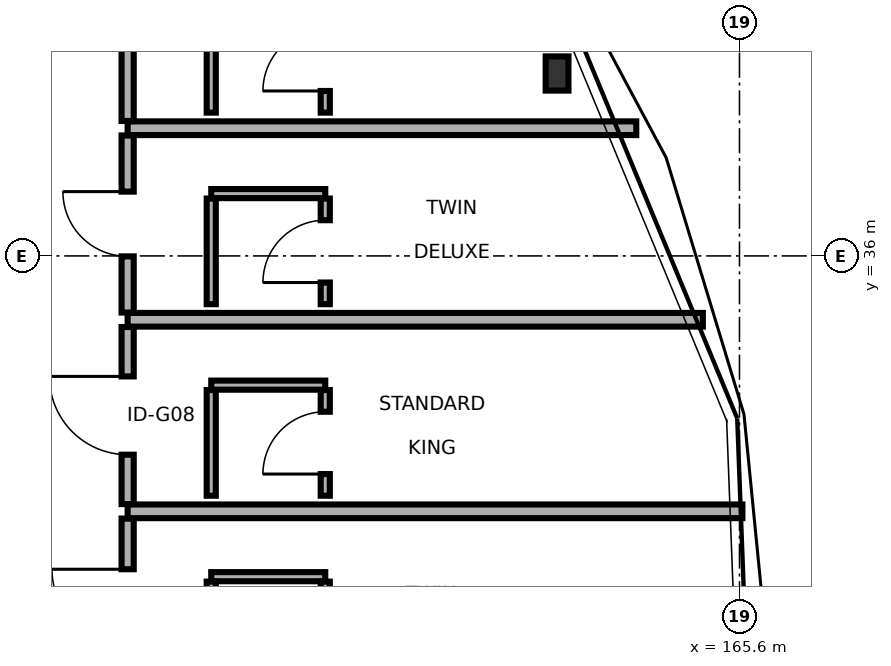
"""IFC4 building model, lengths in metres.
Left out: names, types, materials, properties, quantities, classifications, styles, units other than length and angle.
Written with IfcOpenShell. Run it as: python <this file> out.ifc"""

import sys

from ifc_helpers import new_model, si_unit, direction, frame, frame_2d, origin, origin_2d, place, context, subcontext, project, spatial, rectangle, i_section, extrude, element, fill, save


model = new_model("IFC4")
c1 = context("Model", 3, precision=1e-05, world=origin(), true_north=direction((0.0, 1.0)))
c2 = subcontext(c1, "Body", "Model", "MODEL_VIEW")
j1 = project(units=[si_unit("LENGTHUNIT", "METRE"), si_unit("PLANEANGLEUNIT", "RADIAN")], contexts=[c1])
p1 = place(None, origin())
s1 = spatial("IfcSite", under=j1, at=p1, CompositionType="ELEMENT")
p2 = place(p1, origin())
s2 = spatial("IfcBuilding", under=s1, at=p2, CompositionType="ELEMENT")
p3 = place(p2, frame((0.0, 0.0, 31.7)))
s3 = spatial("IfcBuildingStorey", under=s2, at=p3, CompositionType="ELEMENT", Elevation=31.7)
p4 = place(p3, frame((163.2, 38.4, 0.0), z_axis=(0.0, 0.0, 1.0), x_axis=(1.0, 0.0, 0.0)))
e1 = element("IfcColumn", 1, at=p4, inside=s3, PredefinedType="COLUMN", context=c2, shape_type="SweptSolid", body=[
    extrude(i_section(OverallWidth=0.3, OverallDepth=0.45, WebThickness=0.014, FlangeThickness=0.026, FilletRadius=0.027, at=origin_2d()), origin(), (0.0, 0.0, 1.0), 3.4),
])
p5 = place(p3, frame((157.55, 30.215, 0.0), z_axis=(0.0, 0.0, 1.0), x_axis=(0.0, 1.0, 0.0)))
e2 = element("IfcWall", 2, at=p5, inside=s3, PredefinedType="PARTITIONING", context=c2, shape_type="SweptSolid", body=[
    extrude(rectangle(XDim=2.33, YDim=0.16, at=frame_2d((1.165, 0.0))), origin(), (0.0, 0.0, 1.0), 2.755),
])
p6 = place(p5, frame((0.667, 0.0, 0.0)))
e3 = element("IfcOpeningElement", 3, at=p6, cuts=e2, PredefinedType="OPENING", context=c2, shape_type="SweptSolid", body=[
    extrude(rectangle(XDim=0.996, YDim=2.1, at=frame_2d((0.498, 1.05))), frame((0.0, 0.09, 0.0), z_axis=(0.0, -1.0, 0.0), x_axis=(1.0, 0.0, 0.0)), (0.0, 0.0, 1.0), 0.18),
])
p7 = place(p3, frame((158.65, 31.78, 0.0), z_axis=(0.0, 0.0, 1.0), x_axis=(1.0, 0.0, 0.0)))
e4 = element("IfcWall", 4, at=p7, inside=s3, PredefinedType="PARTITIONING", context=c2, shape_type="SweptSolid", body=[
    extrude(rectangle(XDim=1.5, YDim=0.12, at=frame_2d((0.75, 0.0))), origin(), (0.0, 0.0, 1.0), 3.17),
])
p8 = place(p3, frame((158.65, 30.325, 0.0), z_axis=(0.0, 0.0, 1.0), x_axis=(0.0, 1.0, 0.0)))
e5 = element("IfcWall", 5, at=p8, inside=s3, PredefinedType="PARTITIONING", context=c2, shape_type="SweptSolid", body=[
    extrude(rectangle(XDim=1.39, YDim=0.12, at=frame_2d((0.695, 0.0))), origin(), (0.0, 0.0, 1.0), 2.755),
])
p9 = place(p3, frame((160.15, 30.325, 0.0), z_axis=(0.0, 0.0, 1.0), x_axis=(0.0, 1.0, 0.0)))
e6 = element("IfcWall", 6, at=p9, inside=s3, PredefinedType="PARTITIONING", context=c2, shape_type="SweptSolid", body=[
    extrude(rectangle(XDim=1.39, YDim=0.12, at=frame_2d((0.695, 0.0))), origin(), (0.0, 0.0, 1.0), 2.755),
])
p10 = place(p9, frame((0.285, 0.0, 0.0)))
e7 = element("IfcOpeningElement", 7, at=p10, cuts=e6, PredefinedType="OPENING", context=c2, shape_type="SweptSolid", body=[
    extrude(rectangle(XDim=0.82, YDim=2.08, at=frame_2d((0.41, 1.04))), frame((0.0, 0.07, 0.0), z_axis=(0.0, -1.0, 0.0), x_axis=(1.0, 0.0, 0.0)), (0.0, 0.0, 1.0), 0.14),
])
p11 = place(p3, frame((157.55, 32.64, 0.0), z_axis=(0.0, 0.0, 1.0), x_axis=(1.0, 0.0, 0.0)))
e8 = element("IfcWall", 8, at=p11, inside=s3, PredefinedType="PARTITIONING", context=c2, shape_type="SweptSolid", body=[
    extrude(rectangle(XDim=8.088, YDim=0.18, at=frame_2d((4.044, 0.0))), origin(), (0.0, 0.0, 1.0), 2.655),
])
p12 = place(p3, frame((157.55, 32.735, 0.0), z_axis=(0.0, 0.0, 1.0), x_axis=(0.0, 1.0, 0.0)))
e9 = element("IfcWall", 9, at=p12, inside=s3, PredefinedType="PARTITIONING", context=c2, shape_type="SweptSolid", body=[
    extrude(rectangle(XDim=2.33, YDim=0.16, at=frame_2d((1.165, 0.0))), origin(), (0.0, 0.0, 1.0), 3.17),
])
p13 = place(p12, frame((0.65, 0.0, 0.0)))
e10 = element("IfcOpeningElement", 10, at=p13, cuts=e9, PredefinedType="OPENING", context=c2, shape_type="SweptSolid", body=[
    extrude(rectangle(XDim=1.03, YDim=2.05, at=frame_2d((0.515, 1.025))), frame((0.0, 0.09, 0.0), z_axis=(0.0, -1.0, 0.0), x_axis=(1.0, 0.0, 0.0)), (0.0, 0.0, 1.0), 0.18),
])
p14 = place(p3, frame((158.65, 34.3, 0.0), z_axis=(0.0, 0.0, 1.0), x_axis=(1.0, 0.0, 0.0)))
e11 = element("IfcWall", 11, at=p14, inside=s3, PredefinedType="PARTITIONING", context=c2, shape_type="SweptSolid", body=[
    extrude(rectangle(XDim=1.5, YDim=0.12, at=frame_2d((0.75, 0.0))), origin(), (0.0, 0.0, 1.0), 3.17),
])
p15 = place(p3, frame((158.65, 32.845, 0.0), z_axis=(0.0, 0.0, 1.0), x_axis=(0.0, 1.0, 0.0)))
e12 = element("IfcWall", 12, at=p15, inside=s3, PredefinedType="PARTITIONING", context=c2, shape_type="SweptSolid", body=[
    extrude(rectangle(XDim=1.39, YDim=0.12, at=frame_2d((0.695, 0.0))), origin(), (0.0, 0.0, 1.0), 3.17),
])
p16 = place(p3, frame((160.15, 32.845, 0.0), z_axis=(0.0, 0.0, 1.0), x_axis=(0.0, 1.0, 0.0)))
e13 = element("IfcWall", 13, at=p16, inside=s3, PredefinedType="PARTITIONING", context=c2, shape_type="SweptSolid", body=[
    extrude(rectangle(XDim=1.39, YDim=0.12, at=frame_2d((0.695, 0.0))), origin(), (0.0, 0.0, 1.0), 3.17),
])
p17 = place(p16, frame((0.285, 0.0, 0.0)))
e14 = element("IfcOpeningElement", 14, at=p17, cuts=e13, PredefinedType="OPENING", context=c2, shape_type="SweptSolid", body=[
    extrude(rectangle(XDim=0.82, YDim=2.08, at=frame_2d((0.41, 1.04))), frame((0.0, 0.07, 0.0), z_axis=(0.0, -1.0, 0.0), x_axis=(1.0, 0.0, 0.0)), (0.0, 0.0, 1.0), 0.14),
])
p18 = place(p3, frame((157.55, 35.16, 0.0), z_axis=(0.0, 0.0, 1.0), x_axis=(1.0, 0.0, 0.0)))
e15 = element("IfcWall", 15, at=p18, inside=s3, PredefinedType="PARTITIONING", context=c2, shape_type="SweptSolid", body=[
    extrude(rectangle(XDim=7.568, YDim=0.18, at=frame_2d((3.784, 0.0))), origin(), (0.0, 0.0, 1.0), 2.655),
])
p19 = place(p3, frame((157.55, 35.255, 0.0), z_axis=(0.0, 0.0, 1.0), x_axis=(0.0, 1.0, 0.0)))
e16 = element("IfcWall", 16, at=p19, inside=s3, PredefinedType="PARTITIONING", context=c2, shape_type="SweptSolid", body=[
    extrude(rectangle(XDim=2.33, YDim=0.16, at=frame_2d((1.165, 0.0))), origin(), (0.0, 0.0, 1.0), 3.17),
])
p20 = place(p19, frame((0.739, 0.0, 0.0)))
e17 = element("IfcOpeningElement", 17, at=p20, cuts=e16, PredefinedType="OPENING", context=c2, shape_type="SweptSolid", body=[
    extrude(rectangle(XDim=0.852, YDim=2.1, at=frame_2d((0.426, 1.05))), frame((0.0, 0.09, 0.0), z_axis=(0.0, -1.0, 0.0), x_axis=(1.0, 0.0, 0.0)), (0.0, 0.0, 1.0), 0.18),
])
p21 = place(p3, frame((158.65, 36.82, 0.0), z_axis=(0.0, 0.0, 1.0), x_axis=(1.0, 0.0, 0.0)))
e18 = element("IfcWall", 18, at=p21, inside=s3, PredefinedType="PARTITIONING", context=c2, shape_type="SweptSolid", body=[
    extrude(rectangle(XDim=1.5, YDim=0.12, at=frame_2d((0.75, 0.0))), origin(), (0.0, 0.0, 1.0), 3.17),
])
p22 = place(p3, frame((158.65, 35.365, 0.0), z_axis=(0.0, 0.0, 1.0), x_axis=(0.0, 1.0, 0.0)))
e19 = element("IfcWall", 19, at=p22, inside=s3, PredefinedType="PARTITIONING", context=c2, shape_type="SweptSolid", body=[
    extrude(rectangle(XDim=1.39, YDim=0.12, at=frame_2d((0.695, 0.0))), origin(), (0.0, 0.0, 1.0), 3.17),
])
p23 = place(p3, frame((160.15, 35.365, 0.0), z_axis=(0.0, 0.0, 1.0), x_axis=(0.0, 1.0, 0.0)))
e20 = element("IfcWall", 20, at=p23, inside=s3, PredefinedType="PARTITIONING", context=c2, shape_type="SweptSolid", body=[
    extrude(rectangle(XDim=1.39, YDim=0.12, at=frame_2d((0.695, 0.0))), origin(), (0.0, 0.0, 1.0), 3.17),
])
p24 = place(p23, frame((0.285, 0.0, 0.0)))
e21 = element("IfcOpeningElement", 21, at=p24, cuts=e20, PredefinedType="OPENING", context=c2, shape_type="SweptSolid", body=[
    extrude(rectangle(XDim=0.82, YDim=2.08, at=frame_2d((0.41, 1.04))), frame((0.0, 0.07, 0.0), z_axis=(0.0, -1.0, 0.0), x_axis=(1.0, 0.0, 0.0)), (0.0, 0.0, 1.0), 0.14),
])
p25 = place(p3, frame((157.55, 37.68, 0.0), z_axis=(0.0, 0.0, 1.0), x_axis=(1.0, 0.0, 0.0)))
e22 = element("IfcWall", 22, at=p25, inside=s3, PredefinedType="PARTITIONING", context=c2, shape_type="SweptSolid", body=[
    extrude(rectangle(XDim=6.692, YDim=0.18, at=frame_2d((3.346, 0.0))), origin(), (0.0, 0.0, 1.0), 2.655),
])
p26 = place(p3, frame((157.55, 37.775, 0.0), z_axis=(0.0, 0.0, 1.0), x_axis=(0.0, 1.0, 0.0)))
e23 = element("IfcWall", 23, at=p26, inside=s3, PredefinedType="PARTITIONING", context=c2, shape_type="SweptSolid", body=[
    extrude(rectangle(XDim=2.33, YDim=0.16, at=frame_2d((1.165, 0.0))), origin(), (0.0, 0.0, 1.0), 2.755),
])
p27 = place(p26, frame((1.34, 0.0, 0.0)))
e24 = element("IfcOpeningElement", 24, at=p27, cuts=e23, PredefinedType="OPENING", context=c2, shape_type="SweptSolid", body=[
    extrude(rectangle(XDim=0.83, YDim=2.11, at=frame_2d((0.415, 1.055))), frame((0.0, 0.09, 0.0), z_axis=(0.0, -1.0, 0.0), x_axis=(1.0, 0.0, 0.0)), (0.0, 0.0, 1.0), 0.18),
])
p28 = place(p3, frame((158.65, 37.885, 0.0), z_axis=(0.0, 0.0, 1.0), x_axis=(0.0, 1.0, 0.0)))
e25 = element("IfcWall", 25, at=p28, inside=s3, PredefinedType="PARTITIONING", context=c2, shape_type="SweptSolid", body=[
    extrude(rectangle(XDim=1.39, YDim=0.12, at=frame_2d((0.695, 0.0))), origin(), (0.0, 0.0, 1.0), 2.755),
])
p29 = place(p3, frame((160.15, 37.885, 0.0), z_axis=(0.0, 0.0, 1.0), x_axis=(0.0, 1.0, 0.0)))
e26 = element("IfcWall", 26, at=p29, inside=s3, PredefinedType="PARTITIONING", context=c2, shape_type="SweptSolid", body=[
    extrude(rectangle(XDim=1.39, YDim=0.12, at=frame_2d((0.695, 0.0))), origin(), (0.0, 0.0, 1.0), 2.755),
])
p30 = place(p29, frame((0.285, 0.0, 0.0)))
e27 = element("IfcOpeningElement", 27, at=p30, cuts=e26, PredefinedType="OPENING", context=c2, shape_type="SweptSolid", body=[
    extrude(rectangle(XDim=0.82, YDim=2.08, at=frame_2d((0.41, 1.04))), frame((0.0, 0.07, 0.0), z_axis=(0.0, -1.0, 0.0), x_axis=(1.0, 0.0, 0.0)), (0.0, 0.0, 1.0), 0.14),
])
p31 = place(p6, origin())
e28 = element("IfcDoor", 28, at=p31, inside=s3, OperationType="SINGLE_SWING_RIGHT", PredefinedType="DOOR", context=c2, shape_type="SweptSolid", body=[
    extrude(rectangle(XDim=0.996, YDim=2.1, at=frame_2d((0.498, 1.05))), frame((0.0, 0.025, 0.0), z_axis=(0.0, -1.0, 0.0), x_axis=(1.0, 0.0, 0.0)), (0.0, 0.0, 1.0), 0.05),
])
fill(e3, e28)
p32 = place(p13, origin())
e29 = element("IfcDoor", 29, at=p32, inside=s3, OperationType="SINGLE_SWING_RIGHT", PredefinedType="DOOR", context=c2, shape_type="SweptSolid", body=[
    extrude(rectangle(XDim=1.03, YDim=2.05, at=frame_2d((0.515, 1.025))), frame((0.0, 0.025, 0.0), z_axis=(0.0, -1.0, 0.0), x_axis=(1.0, 0.0, 0.0)), (0.0, 0.0, 1.0), 0.05),
])
fill(e10, e29)
p33 = place(p17, origin())
e30 = element("IfcDoor", 30, at=p33, inside=s3, OperationType="SINGLE_SWING_LEFT", PredefinedType="DOOR", context=c2, shape_type="SweptSolid", body=[
    extrude(rectangle(XDim=0.82, YDim=2.08, at=frame_2d((0.41, 1.04))), frame((0.0, 0.025, 0.0), z_axis=(0.0, -1.0, 0.0), x_axis=(1.0, 0.0, 0.0)), (0.0, 0.0, 1.0), 0.05),
])
fill(e14, e30)
p34 = place(p20, origin())
e31 = element("IfcDoor", 31, at=p34, inside=s3, OperationType="SINGLE_SWING_RIGHT", PredefinedType="DOOR", context=c2, shape_type="SweptSolid", body=[
    extrude(rectangle(XDim=0.852, YDim=2.1, at=frame_2d((0.426, 1.05))), frame((0.0, 0.025, 0.0), z_axis=(0.0, -1.0, 0.0), x_axis=(1.0, 0.0, 0.0)), (0.0, 0.0, 1.0), 0.05),
])
fill(e17, e31)
p35 = place(p24, origin())
e32 = element("IfcDoor", 32, at=p35, inside=s3, OperationType="SINGLE_SWING_LEFT", PredefinedType="DOOR", context=c2, shape_type="SweptSolid", body=[
    extrude(rectangle(XDim=0.82, YDim=2.08, at=frame_2d((0.41, 1.04))), frame((0.0, 0.025, 0.0), z_axis=(0.0, -1.0, 0.0), x_axis=(1.0, 0.0, 0.0)), (0.0, 0.0, 1.0), 0.05),
])
fill(e21, e32)
p36 = place(p30, origin())
e33 = element("IfcDoor", 33, at=p36, inside=s3, OperationType="SINGLE_SWING_LEFT", PredefinedType="DOOR", context=c2, shape_type="SweptSolid", body=[
    extrude(rectangle(XDim=0.82, YDim=2.08, at=frame_2d((0.41, 1.04))), frame((0.0, 0.025, 0.0), z_axis=(0.0, -1.0, 0.0), x_axis=(1.0, 0.0, 0.0)), (0.0, 0.0, 1.0), 0.05),
])
fill(e27, e33)
save(model, sys.argv[1])
